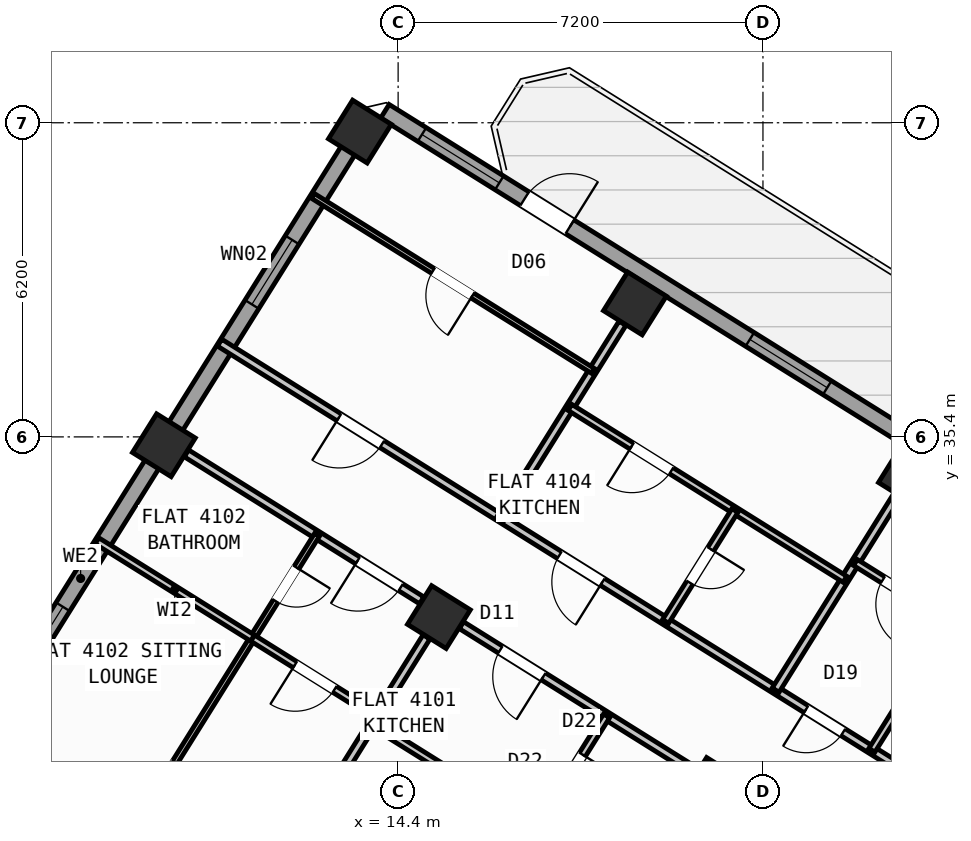
"""IFC4 building model, lengths in metres.
Left out: names, types, materials, properties, quantities, classifications, styles, units other than length and angle.
Written with IfcOpenShell. Run it as: python <this file> out.ifc"""

import sys

from ifc_helpers import new_model, si_unit, direction, frame, frame_2d, origin, origin_2d, place, context, subcontext, project, spatial, rectangle, hollow_rectangle, extrude, source, transform, mapped, element, fill, save


model = new_model("IFC4")
c1 = context("Model", 3, precision=1e-05, world=origin(), true_north=direction((0.0, 1.0)))
c2 = subcontext(c1, "Body", "Model", "MODEL_VIEW")
j1 = project(units=[si_unit("LENGTHUNIT", "METRE"), si_unit("PLANEANGLEUNIT", "RADIAN")], contexts=[c1])
p1 = place(None, origin())
s1 = spatial("IfcSite", under=j1, at=p1, CompositionType="ELEMENT")
p2 = place(p1, origin())
s2 = spatial("IfcBuilding", under=s1, at=p2, CompositionType="ELEMENT")
p3 = place(p2, frame((0.0, 0.0, 162.3)))
s3 = spatial("IfcBuildingStorey", under=s2, at=p3, CompositionType="ELEMENT", Elevation=162.3)
m1 = source(origin(), c2, "Body", "SweptSolid", [
    extrude(hollow_rectangle(XDim=0.9, YDim=0.9, WallThickness=0.036, at=origin_2d()), origin(), (0.0, 0.0, 1.0), 3.6),
])
for number, where, z_axis, x_axis in (
    (1, (24.5, 34.643, 0.0), (0.0, 0.0, 1.0), (-0.848, 0.53, 0.0)),
    (2, (20.632, 28.452, 0.0), (0.0, 0.0, 1.0), (-0.848, 0.53, 0.0)),
    (3, (19.073, 38.034, 0.0), (0.0, 0.0, 1.0), (-0.848, 0.53, 0.0)),
    (4, (15.205, 31.844, 0.0), (0.0, 0.0, 1.0), (-0.848, 0.53, 0.0)),
    (5, (13.646, 41.426, 0.0), (0.0, 0.0, 1.0), (-0.848, 0.53, 0.0)),
    (6, (9.777, 35.235, 0.0), (0.0, 0.0, 1.0), (-0.848, 0.53, 0.0)),
):
    element("IfcColumn", number, at=place(p3, frame(where, z_axis=z_axis, x_axis=x_axis)), inside=s3, PredefinedType="COLUMN", context=c2, shape_type="MappedRepresentation", body=[
        mapped(m1, transform((0.0, 0.0, 0.0), scale=1.0)),
    ])
p4 = place(p3, frame((2.415, 23.452, 0.0), z_axis=(0.0, 0.0, 1.0), x_axis=(0.52991049553, 0.848053575387, 0.0)))
e7 = element("IfcWall", 7, at=p4, inside=s3, PredefinedType="STANDARD", context=c2, shape_type="SweptSolid", body=[
    extrude(rectangle(XDim=21.587, YDim=0.32, at=frame_2d((10.794, 0.0))), origin(), (0.0, 0.0, 1.0), 2.775),
])
p5 = place(p4, frame((1.673, 0.0, 0.8)))
e8 = element("IfcOpeningElement", 8, at=p5, cuts=e7, PredefinedType="OPENING", context=c2, shape_type="SweptSolid", body=[
    extrude(rectangle(XDim=2.1, YDim=1.55, at=frame_2d((1.05, 0.775))), frame((0.0, 0.17, 0.0), z_axis=(0.0, -1.0, 0.0), x_axis=(1.0, 0.0, 0.0)), (0.0, 0.0, 1.0), 0.34),
])
p6 = place(p4, frame((8.334, 0.0, 0.85)))
e9 = element("IfcOpeningElement", 9, at=p6, cuts=e7, PredefinedType="OPENING", context=c2, shape_type="SweptSolid", body=[
    extrude(rectangle(XDim=1.8, YDim=1.5, at=frame_2d((0.9, 0.75))), frame((0.0, 0.17, 0.0), z_axis=(0.0, -1.0, 0.0), x_axis=(1.0, 0.0, 0.0)), (0.0, 0.0, 1.0), 0.34),
])
p7 = place(p4, frame((17.172, 0.0, 0.85)))
e10 = element("IfcOpeningElement", 10, at=p7, cuts=e7, PredefinedType="OPENING", context=c2, shape_type="SweptSolid", body=[
    extrude(rectangle(XDim=1.5, YDim=1.5, at=frame_2d((0.75, 0.75))), frame((0.0, 0.17, 0.0), z_axis=(0.0, -1.0, 0.0), x_axis=(1.0, 0.0, 0.0)), (0.0, 0.0, 1.0), 0.34),
])
p8 = place(p3, frame((14.138, 41.825, 0.0), z_axis=(0.0, 0.0, 1.0), x_axis=(0.848046498049, -0.529921821731, 0.0)))
e11 = element("IfcWall", 11, at=p8, inside=s3, PredefinedType="STANDARD", context=c2, shape_type="SweptSolid", body=[
    extrude(rectangle(XDim=31.588, YDim=0.32, at=frame_2d((15.794, 0.0))), origin(), (0.0, 0.0, 1.0), 3.35),
])
p9 = place(p8, frame((3.253, 0.0, 0.0)))
e12 = element("IfcOpeningElement", 12, at=p9, cuts=e11, PredefinedType="OPENING", context=c2, shape_type="SweptSolid", body=[
    extrude(rectangle(XDim=1.05, YDim=2.15, at=frame_2d((0.525, 1.075))), frame((0.0, 0.17, 0.0), z_axis=(0.0, -1.0, 0.0), x_axis=(1.0, 0.0, 0.0)), (0.0, 0.0, 1.0), 0.34),
])
p10 = place(p8, frame((0.863, 0.0, 0.85)))
e13 = element("IfcOpeningElement", 13, at=p10, cuts=e11, PredefinedType="OPENING", context=c2, shape_type="SweptSolid", body=[
    extrude(rectangle(XDim=1.8, YDim=1.5, at=frame_2d((0.9, 0.75))), frame((0.0, 0.17, 0.0), z_axis=(0.0, -1.0, 0.0), x_axis=(1.0, 0.0, 0.0)), (0.0, 0.0, 1.0), 0.34),
])
p11 = place(p8, frame((8.494, 0.0, 0.85)))
e14 = element("IfcOpeningElement", 14, at=p11, cuts=e11, PredefinedType="OPENING", context=c2, shape_type="SweptSolid", body=[
    extrude(rectangle(XDim=1.8, YDim=1.5, at=frame_2d((0.9, 0.75))), frame((0.0, 0.17, 0.0), z_axis=(0.0, -1.0, 0.0), x_axis=(1.0, 0.0, 0.0)), (0.0, 0.0, 1.0), 0.34),
])
p12 = place(p8, frame((13.874, 0.0, 0.85)))
e15 = element("IfcOpeningElement", 15, at=p12, cuts=e11, PredefinedType="OPENING", context=c2, shape_type="SweptSolid", body=[
    extrude(rectangle(XDim=1.5, YDim=1.5, at=frame_2d((0.75, 0.75))), frame((0.0, 0.17, 0.0), z_axis=(0.0, -1.0, 0.0), x_axis=(1.0, 0.0, 0.0)), (0.0, 0.0, 1.0), 0.34),
])
p13 = place(p8, frame((17.104, 0.0, 1.0)))
e16 = element("IfcOpeningElement", 16, at=p13, cuts=e11, PredefinedType="OPENING", context=c2, shape_type="SweptSolid", body=[
    extrude(rectangle(XDim=0.9, YDim=1.25, at=frame_2d((0.45, 0.625))), frame((0.0, 0.17, 0.0), z_axis=(0.0, -1.0, 0.0), x_axis=(1.0, 0.0, 0.0)), (0.0, 0.0, 1.0), 0.34),
])
p14 = place(p8, frame((22.144, 0.0, 1.0)))
e17 = element("IfcOpeningElement", 17, at=p14, cuts=e11, PredefinedType="OPENING", context=c2, shape_type="SweptSolid", body=[
    extrude(rectangle(XDim=0.9, YDim=1.25, at=frame_2d((0.45, 0.625))), frame((0.0, 0.17, 0.0), z_axis=(0.0, -1.0, 0.0), x_axis=(1.0, 0.0, 0.0)), (0.0, 0.0, 1.0), 0.34),
])
p15 = place(p8, frame((27.744, 0.0, 1.0)))
e18 = element("IfcOpeningElement", 18, at=p15, cuts=e11, PredefinedType="OPENING", context=c2, shape_type="SweptSolid", body=[
    extrude(rectangle(XDim=0.9, YDim=1.25, at=frame_2d((0.45, 0.625))), frame((0.0, 0.17, 0.0), z_axis=(0.0, -1.0, 0.0), x_axis=(1.0, 0.0, 0.0)), (0.0, 0.0, 1.0), 0.34),
])
p16 = place(p3, frame((25.065, 28.394, 0.0), z_axis=(0.0, 0.0, 1.0), x_axis=(-0.848048310262, 0.529918921593, 0.0)))
e19 = element("IfcWall", 19, at=p16, inside=s3, PredefinedType="PARTITIONING", context=c2, shape_type="SweptSolid", body=[
    extrude(rectangle(XDim=16.73, YDim=0.16, at=frame_2d((8.365, 0.0))), origin(), (0.0, 0.0, 1.0), 3.34),
])
p17 = place(p16, frame((2.22, 0.0, 0.0)))
e20 = element("IfcOpeningElement", 20, at=p17, cuts=e19, PredefinedType="OPENING", context=c2, shape_type="SweptSolid", body=[
    extrude(rectangle(XDim=0.86, YDim=2.05, at=frame_2d((0.43, 1.025))), frame((0.0, 0.09, 0.0), z_axis=(0.0, -1.0, 0.0), x_axis=(1.0, 0.0, 0.0)), (0.0, 0.0, 1.0), 0.18),
])
p18 = place(p16, frame((7.82, 0.0, 0.0)))
e21 = element("IfcOpeningElement", 21, at=p18, cuts=e19, PredefinedType="OPENING", context=c2, shape_type="SweptSolid", body=[
    extrude(rectangle(XDim=1.0, YDim=2.1, at=frame_2d((0.5, 1.05))), frame((0.0, 0.09, 0.0), z_axis=(0.0, -1.0, 0.0), x_axis=(1.0, 0.0, 0.0)), (0.0, 0.0, 1.0), 0.18),
])
p19 = place(p16, frame((12.95, 0.0, 0.0)))
e22 = element("IfcOpeningElement", 22, at=p19, cuts=e19, PredefinedType="OPENING", context=c2, shape_type="SweptSolid", body=[
    extrude(rectangle(XDim=1.0, YDim=2.1, at=frame_2d((0.5, 1.05))), frame((0.0, 0.09, 0.0), z_axis=(0.0, -1.0, 0.0), x_axis=(1.0, 0.0, 0.0)), (0.0, 0.0, 1.0), 0.18),
])
p20 = place(p3, frame((20.293, 28.782, 0.0), z_axis=(0.0, 0.0, 1.0), x_axis=(-0.848040881926, 0.529930809241, 0.0)))
e23 = element("IfcWall", 23, at=p20, inside=s3, PredefinedType="PARTITIONING", context=c2, shape_type="SweptSolid", body=[
    extrude(rectangle(XDim=5.476, YDim=0.16, at=frame_2d((2.738, 0.0))), origin(), (0.0, 0.0, 1.0), 2.775),
])
p21 = place(p20, frame((3.568, 0.0, 0.0)))
e24 = element("IfcOpeningElement", 24, at=p21, cuts=e23, PredefinedType="OPENING", context=c2, shape_type="SweptSolid", body=[
    extrude(rectangle(XDim=1.0, YDim=2.1, at=frame_2d((0.5, 1.05))), frame((0.0, 0.09, 0.0), z_axis=(0.0, -1.0, 0.0), x_axis=(1.0, 0.0, 0.0)), (0.0, 0.0, 1.0), 0.18),
])
p22 = place(p3, frame((14.866, 32.173, 0.0), z_axis=(0.0, 0.0, 1.0), x_axis=(-0.848053401719, 0.529910773464, 0.0)))
e25 = element("IfcWall", 25, at=p22, inside=s3, PredefinedType="PARTITIONING", context=c2, shape_type="SweptSolid", body=[
    extrude(rectangle(XDim=5.476, YDim=0.16, at=frame_2d((2.738, 0.0))), origin(), (0.0, 0.0, 1.0), 2.775),
])
p23 = place(p22, frame((0.488, 0.0, 0.0)))
e26 = element("IfcOpeningElement", 26, at=p23, cuts=e25, PredefinedType="OPENING", context=c2, shape_type="SweptSolid", body=[
    extrude(rectangle(XDim=1.0, YDim=2.1, at=frame_2d((0.5, 1.05))), frame((0.0, 0.09, 0.0), z_axis=(0.0, -1.0, 0.0), x_axis=(1.0, 0.0, 0.0)), (0.0, 0.0, 1.0), 0.18),
])
p24 = place(p3, frame((14.96, 31.452, 0.0), z_axis=(0.0, 0.0, 1.0), x_axis=(-0.529947310719, -0.848030570122, 0.0)))
e27 = element("IfcWall", 27, at=p24, inside=s3, PredefinedType="PARTITIONING", context=c2, shape_type="SweptSolid", body=[
    extrude(rectangle(XDim=6.376, YDim=0.16, at=frame_2d((3.188, 0.0))), origin(), (0.0, 0.0, 1.0), 2.775),
])
p25 = place(p3, frame((19.318, 26.349, 0.0), z_axis=(0.0, 0.0, 1.0), x_axis=(-0.848039019877, 0.529933789039, 0.0)))
e28 = element("IfcWall", 28, at=p25, inside=s3, PredefinedType="PLUMBINGWALL", context=c2, shape_type="SweptSolid", body=[
    extrude(rectangle(XDim=6.4, YDim=0.14, at=frame_2d((3.2, 0.0))), origin(), (0.0, 0.0, 1.0), 3.34),
])
p26 = place(p25, frame((2.824, 0.0, 0.0)))
e29 = element("IfcOpeningElement", 29, at=p26, cuts=e28, PredefinedType="OPENING", context=c2, shape_type="SweptSolid", body=[
    extrude(rectangle(XDim=0.78, YDim=2.05, at=frame_2d((0.39, 1.025))), frame((0.0, 0.08, 0.0), z_axis=(0.0, -1.0, 0.0), x_axis=(1.0, 0.0, 0.0)), (0.0, 0.0, 1.0), 0.16),
])
p27 = place(p3, frame((18.514, 29.894, 0.0), z_axis=(0.0, 0.0, 1.0), x_axis=(-0.529913878929, -0.848051461244, 0.0)))
e30 = element("IfcWall", 30, at=p27, inside=s3, PredefinedType="PLUMBINGWALL", context=c2, shape_type="SweptSolid", body=[
    extrude(rectangle(XDim=2.58, YDim=0.14, at=frame_2d((1.29, 0.0))), origin(), (0.0, 0.0, 1.0), 3.34),
])
p28 = place(p27, frame((0.9, 0.0, 0.0)))
e31 = element("IfcOpeningElement", 31, at=p28, cuts=e30, PredefinedType="OPENING", context=c2, shape_type="SweptSolid", body=[
    extrude(rectangle(XDim=0.78, YDim=2.05, at=frame_2d((0.39, 1.025))), frame((0.0, 0.08, 0.0), z_axis=(0.0, -1.0, 0.0), x_axis=(1.0, 0.0, 0.0)), (0.0, 0.0, 1.0), 0.16),
])
p29 = place(p3, frame((12.798, 33.465, 0.0), z_axis=(0.0, 0.0, 1.0), x_axis=(-0.529916182913, -0.848050021571, 0.0)))
e32 = element("IfcWall", 32, at=p29, inside=s3, PredefinedType="PARTITIONING", context=c2, shape_type="SweptSolid", body=[
    extrude(rectangle(XDim=14.32, YDim=0.11, at=frame_2d((7.16, 0.0))), origin(), (0.0, 0.0, 1.0), 3.34),
])
p30 = place(p29, frame((0.76, 0.0, 0.0)))
e33 = element("IfcOpeningElement", 33, at=p30, cuts=e32, PredefinedType="OPENING", context=c2, shape_type="SweptSolid", body=[
    extrude(rectangle(XDim=0.78, YDim=2.05, at=frame_2d((0.39, 1.025))), frame((0.0, 0.065, 0.0), z_axis=(0.0, -1.0, 0.0), x_axis=(1.0, 0.0, 0.0)), (0.0, 0.0, 1.0), 0.13),
])
p31 = place(p29, frame((5.281, 0.0, 0.0)))
e34 = element("IfcOpeningElement", 34, at=p31, cuts=e32, PredefinedType="OPENING", context=c2, shape_type="SweptSolid", body=[
    extrude(rectangle(XDim=0.92, YDim=2.08, at=frame_2d((0.46, 1.04))), frame((0.0, 0.065, 0.0), z_axis=(0.0, -1.0, 0.0), x_axis=(1.0, 0.0, 0.0)), (0.0, 0.0, 1.0), 0.13),
])
p32 = place(p3, frame((13.986, 29.893, 0.0), z_axis=(0.0, 0.0, 1.0), x_axis=(-0.84802195137, 0.529961102341, 0.0)))
e35 = element("IfcWall", 35, at=p32, inside=s3, PredefinedType="PLUMBINGWALL", context=c2, shape_type="SweptSolid", body=[
    extrude(rectangle(XDim=2.9, YDim=0.14, at=frame_2d((1.45, 0.0))), origin(), (0.0, 0.0, 1.0), 3.34),
])
p33 = place(p32, frame((0.99, 0.0, 0.0)))
e36 = element("IfcOpeningElement", 36, at=p33, cuts=e35, PredefinedType="OPENING", context=c2, shape_type="SweptSolid", body=[
    extrude(rectangle(XDim=0.92, YDim=2.08, at=frame_2d((0.46, 1.04))), frame((0.0, 0.08, 0.0), z_axis=(0.0, -1.0, 0.0), x_axis=(1.0, 0.0, 0.0)), (0.0, 0.0, 1.0), 0.16),
])
p34 = place(p3, frame((11.526, 31.43, 0.0), z_axis=(0.0, 0.0, 1.0), x_axis=(-0.848051346257, 0.52991406295, 0.0)))
e37 = element("IfcWall", 37, at=p34, inside=s3, PredefinedType="PLUMBINGWALL", context=c2, shape_type="SweptSolid", body=[
    extrude(rectangle(XDim=3.62, YDim=0.14, at=frame_2d((1.81, 0.0))), origin(), (0.0, 0.0, 1.0), 3.34),
])
p35 = place(p3, frame((24.256, 34.251, 0.0), z_axis=(0.0, 0.0, 1.0), x_axis=(-0.529926399231, -0.848043637673, 0.0)))
e38 = element("IfcWall", 38, at=p35, inside=s3, PredefinedType="PARTITIONING", context=c2, shape_type="SweptSolid", body=[
    extrude(rectangle(XDim=4.538, YDim=0.16, at=frame_2d((2.269, 0.0))), origin(), (0.0, 0.0, 1.0), 2.775),
])
p36 = place(p3, frame((26.639, 30.913, 0.0), z_axis=(0.0, 0.0, 1.0), x_axis=(-0.84803087207, 0.529946827537, 0.0)))
e39 = element("IfcWall", 39, at=p36, inside=s3, PredefinedType="PLUMBINGWALL", context=c2, shape_type="SweptSolid", body=[
    extrude(rectangle(XDim=3.79, YDim=0.14, at=frame_2d((1.895, 0.0))), origin(), (0.0, 0.0, 1.0), 3.34),
])
p37 = place(p36, frame((2.23, 0.0, 0.0)))
e40 = element("IfcOpeningElement", 40, at=p37, cuts=e39, PredefinedType="OPENING", context=c2, shape_type="SweptSolid", body=[
    extrude(rectangle(XDim=0.92, YDim=2.08, at=frame_2d((0.46, 1.04))), frame((0.0, 0.08, 0.0), z_axis=(0.0, -1.0, 0.0), x_axis=(1.0, 0.0, 0.0)), (0.0, 0.0, 1.0), 0.16),
])
p38 = place(p3, frame((25.324, 31.734, 0.0), z_axis=(0.0, 0.0, 1.0), x_axis=(-0.529873322326, -0.848076802116, 0.0)))
e41 = element("IfcWall", 41, at=p38, inside=s3, PredefinedType="PLUMBINGWALL", context=c2, shape_type="SweptSolid", body=[
    extrude(rectangle(XDim=2.97, YDim=0.14, at=frame_2d((1.485, 0.0))), origin(), (0.0, 0.0, 1.0), 2.995),
])
p39 = place(p38, frame((1.095, 0.0, 0.0)))
e42 = element("IfcOpeningElement", 42, at=p39, cuts=e41, PredefinedType="OPENING", context=c2, shape_type="SweptSolid", body=[
    extrude(rectangle(XDim=0.78, YDim=2.05, at=frame_2d((0.39, 1.025))), frame((0.0, 0.08, 0.0), z_axis=(0.0, -1.0, 0.0), x_axis=(1.0, 0.0, 0.0)), (0.0, 0.0, 1.0), 0.16),
])
p40 = place(p3, frame((18.828, 37.643, 0.0), z_axis=(0.0, 0.0, 1.0), x_axis=(-0.529926399231, -0.848043637673, 0.0)))
e43 = element("IfcWall", 43, at=p40, inside=s3, PredefinedType="PARTITIONING", context=c2, shape_type="SweptSolid", body=[
    extrude(rectangle(XDim=4.538, YDim=0.16, at=frame_2d((2.269, 0.0))), origin(), (0.0, 0.0, 1.0), 2.775),
])
p41 = place(p3, frame((23.218, 32.591, 0.0), z_axis=(0.0, 0.0, 1.0), x_axis=(-0.848056163074, 0.529906354247, 0.0)))
e44 = element("IfcWall", 44, at=p41, inside=s3, PredefinedType="PLUMBINGWALL", context=c2, shape_type="SweptSolid", body=[
    extrude(rectangle(XDim=6.4, YDim=0.14, at=frame_2d((3.2, 0.0))), origin(), (0.0, 0.0, 1.0), 3.34),
])
p42 = place(p41, frame((4.04, 0.0, 0.0)))
e45 = element("IfcOpeningElement", 45, at=p42, cuts=e44, PredefinedType="OPENING", context=c2, shape_type="SweptSolid", body=[
    extrude(rectangle(XDim=0.92, YDim=2.08, at=frame_2d((0.46, 1.04))), frame((0.0, 0.08, 0.0), z_axis=(0.0, -1.0, 0.0), x_axis=(1.0, 0.0, 0.0)), (0.0, 0.0, 1.0), 0.16),
])
p43 = place(p3, frame((21.047, 33.947, 0.0), z_axis=(0.0, 0.0, 1.0), x_axis=(-0.529913878929, -0.848051461244, 0.0)))
e46 = element("IfcWall", 46, at=p43, inside=s3, PredefinedType="PLUMBINGWALL", context=c2, shape_type="SweptSolid", body=[
    extrude(rectangle(XDim=2.58, YDim=0.14, at=frame_2d((1.29, 0.0))), origin(), (0.0, 0.0, 1.0), 3.34),
])
p44 = place(p43, frame((0.9, 0.0, 0.0)))
e47 = element("IfcOpeningElement", 47, at=p44, cuts=e46, PredefinedType="OPENING", context=c2, shape_type="SweptSolid", body=[
    extrude(rectangle(XDim=0.78, YDim=2.05, at=frame_2d((0.39, 1.025))), frame((0.0, 0.08, 0.0), z_axis=(0.0, -1.0, 0.0), x_axis=(1.0, 0.0, 0.0)), (0.0, 0.0, 1.0), 0.16),
])
p45 = place(p3, frame((18.242, 36.705, 0.0), z_axis=(0.0, 0.0, 1.0), x_axis=(-0.848048787466, 0.529918157905, 0.0)))
e48 = element("IfcWall", 48, at=p45, inside=s3, PredefinedType="PARTITIONING", context=c2, shape_type="SweptSolid", body=[
    extrude(rectangle(XDim=6.52, YDim=0.11, at=frame_2d((3.26, 0.0))), origin(), (0.0, 0.0, 1.0), 3.34),
])
p46 = place(p45, frame((2.8, 0.0, 0.0)))
e49 = element("IfcOpeningElement", 49, at=p46, cuts=e48, PredefinedType="OPENING", context=c2, shape_type="SweptSolid", body=[
    extrude(rectangle(XDim=0.92, YDim=2.08, at=frame_2d((0.46, 1.04))), frame((0.0, 0.065, 0.0), z_axis=(0.0, -1.0, 0.0), x_axis=(1.0, 0.0, 0.0)), (0.0, 0.0, 1.0), 0.13),
])
m2 = source(origin(), c2, "Body", "SweptSolid", [
    extrude(rectangle(XDim=1.05, YDim=2.15, at=frame_2d((0.525, 1.075))), frame((0.0, 0.025, 0.0), z_axis=(0.0, -1.0, 0.0), x_axis=(1.0, 0.0, 0.0)), (0.0, 0.0, 1.0), 0.05),
])
p47 = place(p9, origin())
e50 = element("IfcDoor", 50, at=p47, inside=s3, OperationType="SINGLE_SWING_RIGHT", PredefinedType="DOOR", context=c2, shape_type="MappedRepresentation", body=[
    mapped(m2, transform((0.0, 0.0, 0.0), scale=1.0)),
])
fill(e12, e50)
m3 = source(origin(), c2, "Body", "SweptSolid", [
    extrude(rectangle(XDim=1.8, YDim=1.5, at=frame_2d((0.9, 0.75))), frame((0.0, 0.03, 0.0), z_axis=(0.0, -1.0, 0.0), x_axis=(1.0, 0.0, 0.0)), (0.0, 0.0, 1.0), 0.06),
])
p48 = place(p6, origin())
e51 = element("IfcWindow", 51, at=p48, inside=s3, PartitioningType="SINGLE_PANEL", PredefinedType="WINDOW", context=c2, shape_type="MappedRepresentation", body=[
    mapped(m3, transform((0.0, 0.0, 0.0), scale=1.0)),
])
fill(e9, e51)
m4 = source(origin(), c2, "Body", "SweptSolid", [
    extrude(rectangle(XDim=1.5, YDim=1.5, at=frame_2d((0.75, 0.75))), frame((0.0, 0.03, 0.0), z_axis=(0.0, -1.0, 0.0), x_axis=(1.0, 0.0, 0.0)), (0.0, 0.0, 1.0), 0.06),
])
p49 = place(p7, origin())
e52 = element("IfcWindow", 52, at=p49, inside=s3, PartitioningType="SINGLE_PANEL", PredefinedType="WINDOW", context=c2, shape_type="MappedRepresentation", body=[
    mapped(m4, transform((0.0, 0.0, 0.0), scale=1.0)),
])
fill(e10, e52)
p50 = place(p10, origin())
e53 = element("IfcWindow", 53, at=p50, inside=s3, PartitioningType="SINGLE_PANEL", PredefinedType="WINDOW", context=c2, shape_type="MappedRepresentation", body=[
    mapped(m3, transform((0.0, 0.0, 0.0), scale=1.0)),
])
fill(e13, e53)
p51 = place(p11, origin())
e54 = element("IfcWindow", 54, at=p51, inside=s3, PartitioningType="SINGLE_PANEL", PredefinedType="WINDOW", context=c2, shape_type="MappedRepresentation", body=[
    mapped(m3, transform((0.0, 0.0, 0.0), scale=1.0)),
])
fill(e14, e54)
m5 = source(origin(), c2, "Body", "SweptSolid", [
    extrude(rectangle(XDim=1.0, YDim=2.1, at=frame_2d((0.5, 1.05))), frame((0.0, 0.025, 0.0), z_axis=(0.0, -1.0, 0.0), x_axis=(1.0, 0.0, 0.0)), (0.0, 0.0, 1.0), 0.05),
])
p52 = place(p21, origin())
e55 = element("IfcDoor", 55, at=p52, inside=s3, OperationType="SINGLE_SWING_LEFT", PredefinedType="DOOR", context=c2, shape_type="MappedRepresentation", body=[
    mapped(m5, transform((0.0, 0.0, 0.0), scale=1.0)),
])
fill(e24, e55)
m6 = source(origin(), c2, "Body", "SweptSolid", [
    extrude(rectangle(XDim=0.78, YDim=2.05, at=frame_2d((0.39, 1.025))), frame((0.0, 0.025, 0.0), z_axis=(0.0, -1.0, 0.0), x_axis=(1.0, 0.0, 0.0)), (0.0, 0.0, 1.0), 0.05),
])
p53 = place(p28, origin())
e56 = element("IfcDoor", 56, at=p53, inside=s3, OperationType="SINGLE_SWING_LEFT", PredefinedType="DOOR", context=c2, shape_type="MappedRepresentation", body=[
    mapped(m6, transform((0.0, 0.0, 0.0), scale=1.0)),
])
fill(e31, e56)
p54 = place(p23, origin())
e57 = element("IfcDoor", 57, at=p54, inside=s3, OperationType="SINGLE_SWING_RIGHT", PredefinedType="DOOR", context=c2, shape_type="MappedRepresentation", body=[
    mapped(m5, transform((0.0, 0.0, 0.0), scale=1.0)),
])
fill(e26, e57)
m7 = source(origin(), c2, "Body", "SweptSolid", [
    extrude(rectangle(XDim=0.92, YDim=2.08, at=frame_2d((0.46, 1.04))), frame((0.0, 0.025, 0.0), z_axis=(0.0, -1.0, 0.0), x_axis=(1.0, 0.0, 0.0)), (0.0, 0.0, 1.0), 0.05),
])
p55 = place(p33, origin())
e58 = element("IfcDoor", 58, at=p55, inside=s3, OperationType="SINGLE_SWING_RIGHT", PredefinedType="DOOR", context=c2, shape_type="MappedRepresentation", body=[
    mapped(m7, transform((0.0, 0.0, 0.0), scale=1.0)),
])
fill(e36, e58)
p56 = place(p30, origin())
e59 = element("IfcDoor", 59, at=p56, inside=s3, OperationType="SINGLE_SWING_LEFT", PredefinedType="DOOR", context=c2, shape_type="MappedRepresentation", body=[
    mapped(m6, transform((0.0, 0.0, 0.0), scale=1.0)),
])
fill(e33, e59)
p57 = place(p31, origin())
e60 = element("IfcDoor", 60, at=p57, inside=s3, OperationType="SINGLE_SWING_RIGHT", PredefinedType="DOOR", context=c2, shape_type="MappedRepresentation", body=[
    mapped(m7, transform((0.0, 0.0, 0.0), scale=1.0)),
])
fill(e34, e60)
m8 = source(origin(), c2, "Body", "SweptSolid", [
    extrude(rectangle(XDim=0.86, YDim=2.05, at=frame_2d((0.43, 1.025))), frame((0.0, 0.025, 0.0), z_axis=(0.0, -1.0, 0.0), x_axis=(1.0, 0.0, 0.0)), (0.0, 0.0, 1.0), 0.05),
])
p58 = place(p17, origin())
e61 = element("IfcDoor", 61, at=p58, inside=s3, OperationType="SINGLE_SWING_RIGHT", PredefinedType="DOOR", context=c2, shape_type="MappedRepresentation", body=[
    mapped(m8, transform((0.0, 0.0, 0.0), scale=1.0)),
])
fill(e20, e61)
p59 = place(p37, origin())
e62 = element("IfcDoor", 62, at=p59, inside=s3, OperationType="SINGLE_SWING_LEFT", PredefinedType="DOOR", context=c2, shape_type="MappedRepresentation", body=[
    mapped(m7, transform((0.0, 0.0, 0.0), scale=1.0)),
])
fill(e40, e62)
p60 = place(p18, origin())
e63 = element("IfcDoor", 63, at=p60, inside=s3, OperationType="SINGLE_SWING_LEFT", PredefinedType="DOOR", context=c2, shape_type="MappedRepresentation", body=[
    mapped(m5, transform((0.0, 0.0, 0.0), scale=1.0)),
])
fill(e21, e63)
p61 = place(p42, origin())
e64 = element("IfcDoor", 64, at=p61, inside=s3, OperationType="SINGLE_SWING_RIGHT", PredefinedType="DOOR", context=c2, shape_type="MappedRepresentation", body=[
    mapped(m7, transform((0.0, 0.0, 0.0), scale=1.0)),
])
fill(e45, e64)
p62 = place(p44, origin())
e65 = element("IfcDoor", 65, at=p62, inside=s3, OperationType="SINGLE_SWING_LEFT", PredefinedType="DOOR", context=c2, shape_type="MappedRepresentation", body=[
    mapped(m6, transform((0.0, 0.0, 0.0), scale=1.0)),
])
fill(e47, e65)
p63 = place(p19, origin())
e66 = element("IfcDoor", 66, at=p63, inside=s3, OperationType="SINGLE_SWING_RIGHT", PredefinedType="DOOR", context=c2, shape_type="MappedRepresentation", body=[
    mapped(m5, transform((0.0, 0.0, 0.0), scale=1.0)),
])
fill(e22, e66)
p64 = place(p46, origin())
e67 = element("IfcDoor", 67, at=p64, inside=s3, OperationType="SINGLE_SWING_LEFT", PredefinedType="DOOR", context=c2, shape_type="MappedRepresentation", body=[
    mapped(m7, transform((0.0, 0.0, 0.0), scale=1.0)),
])
fill(e49, e67)
save(model, sys.argv[1])
